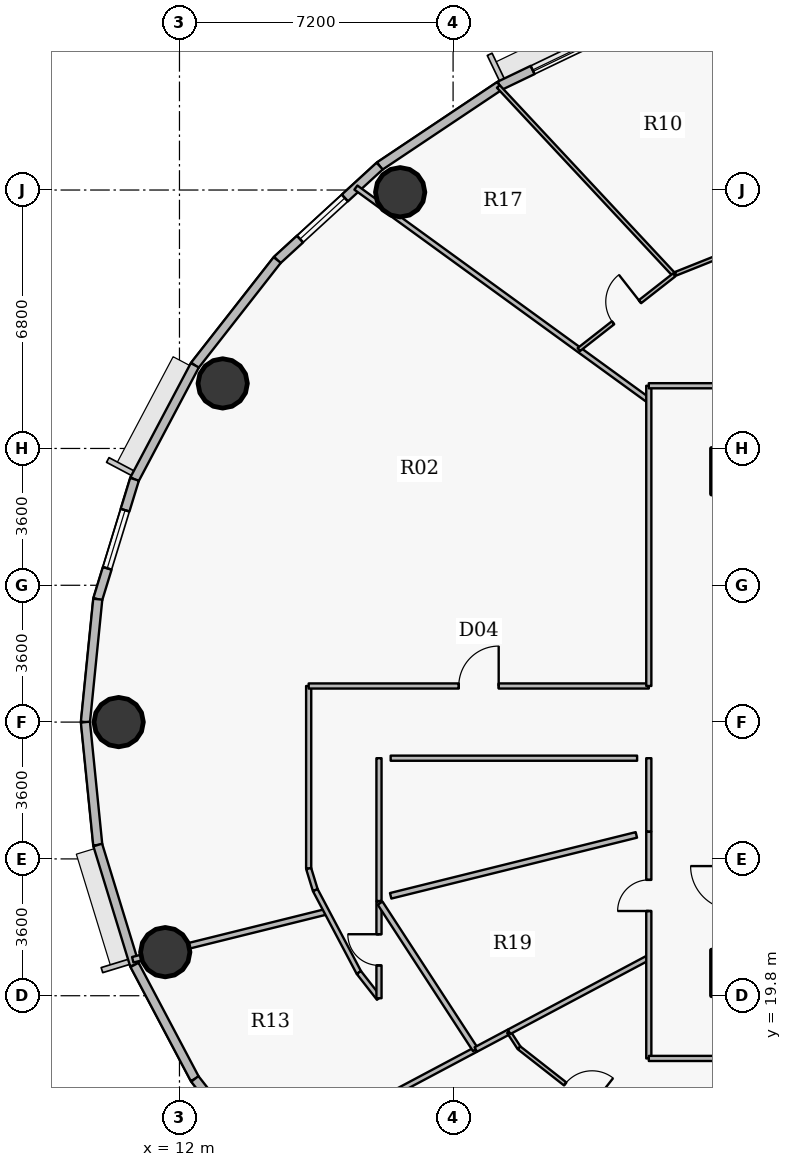
"""IFC4 building model, lengths in metres.
Left out: names, types, materials, properties, quantities, classifications, styles, units other than length and angle.
Written with IfcOpenShell. Run it as: python <this file> out.ifc"""

import sys

from ifc_helpers import new_model, si_unit, direction, frame, frame_2d, origin, origin_2d, place, context, subcontext, project, spatial, rectangle, hollow_circle, extrude, source, transform, mapped, element, fill, save


model = new_model("IFC4")
c1 = context("Model", 3, precision=1e-05, world=origin(), true_north=direction((0.0, 1.0)))
c2 = subcontext(c1, "Body", "Model", "MODEL_VIEW")
j1 = project(units=[si_unit("LENGTHUNIT", "METRE"), si_unit("PLANEANGLEUNIT", "RADIAN")], contexts=[c1])
p1 = place(None, origin())
s1 = spatial("IfcSite", under=j1, at=p1, CompositionType="ELEMENT")
p2 = place(p1, origin())
s2 = spatial("IfcBuilding", under=s1, at=p2, CompositionType="ELEMENT")
p3 = place(p2, frame((0.0, 0.0, 201.15)))
s3 = spatial("IfcBuildingStorey", under=s2, at=p3, CompositionType="ELEMENT", Elevation=201.15)
for number, where, z_axis, x_axis in (
    (1, (26.6, 20.4, 0.0), (0.0, 0.0, 1.0), (1.0, 0.0, 0.0)),
    (2, (26.6, 33.6, 0.0), (0.0, 0.0, 1.0), (1.0, 0.0, 0.0)),
):
    element("IfcColumn", number, at=place(p3, frame(where, z_axis=z_axis, x_axis=x_axis)), inside=s3, PredefinedType="COLUMN", context=c2, shape_type="SweptSolid", body=[
        extrude(rectangle(XDim=1.2, YDim=1.2, at=origin_2d()), origin(), (0.0, 0.0, 1.0), 3.75),
    ])
for number, where, z_axis, x_axis in (
    (3, (17.808, 40.942, 0.0), (0.0, 0.0, 1.0), (1.0, 0.0, 0.0)),
    (4, (13.137, 35.911, 0.0), (0.0, 0.0, 1.0), (1.0, 0.0, 0.0)),
    (5, (10.4, 27.0, 0.0), (0.0, 0.0, 1.0), (1.0, 0.0, 0.0)),
    (6, (11.625, 20.947, 0.0), (0.0, 0.0, 1.0), (1.0, 0.0, 0.0)),
):
    element("IfcColumn", number, at=place(p3, frame(where, z_axis=z_axis, x_axis=x_axis)), inside=s3, PredefinedType="COLUMN", context=c2, shape_type="SweptSolid", body=[
        extrude(hollow_circle(Radius=0.65, WallThickness=0.04, at=origin_2d()), origin(), (0.0, 0.0, 1.0), 3.75),
    ])
p4 = place(p3, frame((20.427, 43.743, 0.0), z_axis=(0.0, 0.0, 1.0), x_axis=(0.901564733809, 0.432644231155, 0.0)))
e7 = element("IfcWall", 7, at=p4, inside=s3, PredefinedType="SOLIDWALL", context=c2, shape_type="SweptSolid", body=[
    extrude(rectangle(XDim=3.93, YDim=0.24, at=frame_2d((1.965, 0.0))), origin(), (0.0, 0.0, 1.0), 3.45),
])
p5 = place(p4, frame((0.96, 0.0, 0.9)))
e8 = element("IfcOpeningElement", 8, at=p5, cuts=e7, PredefinedType="OPENING", context=c2, shape_type="SweptSolid", body=[
    extrude(rectangle(XDim=2.0, YDim=1.75, at=origin_2d()), frame((1.0, 0.13, 0.875), z_axis=(0.0, -1.0, 0.0), x_axis=(1.0, 0.0, 0.0)), (0.0, 0.0, 1.0), 0.26),
])
p6 = place(p3, frame((17.268, 41.631, 0.0), z_axis=(0.0, 0.0, 1.0), x_axis=(0.831228998277, 0.555930168657, 0.0)))
e9 = element("IfcWall", 9, at=p6, inside=s3, PredefinedType="SOLIDWALL", context=c2, shape_type="SweptSolid", body=[
    extrude(rectangle(XDim=3.8, YDim=0.24, at=frame_2d((1.9, 0.0))), origin(), (0.0, 0.0, 1.0), 3.45),
])
p7 = place(p3, frame((14.572, 39.158, 0.0), z_axis=(0.0, 0.0, 1.0), x_axis=(0.737076565834, 0.675809245349, 0.0)))
e10 = element("IfcWall", 10, at=p7, inside=s3, PredefinedType="SOLIDWALL", context=c2, shape_type="SweptSolid", body=[
    extrude(rectangle(XDim=3.658, YDim=0.24, at=frame_2d((1.829, 0.0))), origin(), (0.0, 0.0, 1.0), 3.45),
])
p8 = place(p7, frame((0.815, 0.0, 0.9)))
e11 = element("IfcOpeningElement", 11, at=p8, cuts=e10, PredefinedType="OPENING", context=c2, shape_type="SweptSolid", body=[
    extrude(rectangle(XDim=1.6, YDim=1.75, at=origin_2d()), frame((0.8, 0.13, 0.875), z_axis=(0.0, -1.0, 0.0), x_axis=(1.0, 0.0, 0.0)), (0.0, 0.0, 1.0), 0.26),
])
p9 = place(p3, frame((12.404, 36.388, 0.0), z_axis=(0.0, 0.0, 1.0), x_axis=(0.616287674549, 0.787521112224, 0.0)))
e12 = element("IfcWall", 12, at=p9, inside=s3, PredefinedType="SOLIDWALL", context=c2, shape_type="SweptSolid", body=[
    extrude(rectangle(XDim=3.517, YDim=0.24, at=frame_2d((1.759, 0.0))), origin(), (0.0, 0.0, 1.0), 3.45),
])
p10 = place(p3, frame((10.817, 33.389, 0.0), z_axis=(0.0, 0.0, 1.0), x_axis=(0.467586874938, 0.88394712194, 0.0)))
e13 = element("IfcWall", 13, at=p10, inside=s3, PredefinedType="SOLIDWALL", context=c2, shape_type="SweptSolid", body=[
    extrude(rectangle(XDim=3.393, YDim=0.24, at=frame_2d((1.697, 0.0))), origin(), (0.0, 0.0, 1.0), 3.45),
])
p11 = place(p3, frame((9.85, 30.234, 0.0), z_axis=(0.0, 0.0, 1.0), x_axis=(0.293097995113, 0.956082405058, 0.0)))
e14 = element("IfcWall", 14, at=p11, inside=s3, PredefinedType="SOLIDWALL", context=c2, shape_type="SweptSolid", body=[
    extrude(rectangle(XDim=3.3, YDim=0.24, at=frame_2d((1.65, 0.0))), origin(), (0.0, 0.0, 1.0), 3.45),
])
p12 = place(p11, frame((0.85, 0.0, 0.9)))
e15 = element("IfcOpeningElement", 15, at=p12, cuts=e14, PredefinedType="OPENING", context=c2, shape_type="SweptSolid", body=[
    extrude(rectangle(XDim=1.6, YDim=1.75, at=origin_2d()), frame((0.8, 0.13, 0.875), z_axis=(0.0, -1.0, 0.0), x_axis=(1.0, 0.0, 0.0)), (0.0, 0.0, 1.0), 0.26),
])
for number, where, z_axis, x_axis in (
    (16, (9.525, 27.0, 0.0), (0.0, 0.0, 1.0), (0.1, 0.995, 0.0)),
    (17, (9.85, 23.766, 0.0), (0.0, 0.0, 1.0), (-0.1, 0.995, 0.0)),
):
    element("IfcWall", number, at=place(p3, frame(where, z_axis=z_axis, x_axis=x_axis)), inside=s3, PredefinedType="SOLIDWALL", context=c2, shape_type="SweptSolid", body=[
        extrude(rectangle(XDim=3.25, YDim=0.24, at=frame_2d((1.625, 0.0))), origin(), (0.0, 0.0, 1.0), 3.45),
    ])
p13 = place(p3, frame((10.817, 20.611, 0.0), z_axis=(0.0, 0.0, 1.0), x_axis=(-0.293097995113, 0.956082405058, 0.0)))
e18 = element("IfcWall", 18, at=p13, inside=s3, PredefinedType="SOLIDWALL", context=c2, shape_type="SweptSolid", body=[
    extrude(rectangle(XDim=3.3, YDim=0.24, at=frame_2d((1.65, 0.0))), origin(), (0.0, 0.0, 1.0), 3.45),
])
p14 = place(p3, frame((12.404, 17.612, 0.0), z_axis=(0.0, 0.0, 1.0), x_axis=(-0.467586874938, 0.88394712194, 0.0)))
e19 = element("IfcWall", 19, at=p14, inside=s3, PredefinedType="SOLIDWALL", context=c2, shape_type="SweptSolid", body=[
    extrude(rectangle(XDim=3.393, YDim=0.24, at=frame_2d((1.697, 0.0))), origin(), (0.0, 0.0, 1.0), 3.45),
])
p15 = place(p3, frame((14.572, 14.842, 0.0), z_axis=(0.0, 0.0, 1.0), x_axis=(-0.616287674549, 0.787521112224, 0.0)))
e20 = element("IfcWall", 20, at=p15, inside=s3, PredefinedType="SOLIDWALL", context=c2, shape_type="SweptSolid", body=[
    extrude(rectangle(XDim=3.517, YDim=0.24, at=frame_2d((1.759, 0.0))), origin(), (0.0, 0.0, 1.0), 3.45),
])
p16 = place(p15, frame((0.819, 0.0, 0.9)))
e21 = element("IfcOpeningElement", 21, at=p16, cuts=e20, PredefinedType="OPENING", context=c2, shape_type="SweptSolid", body=[
    extrude(rectangle(XDim=2.0, YDim=1.75, at=origin_2d()), frame((1.0, 0.13, 0.875), z_axis=(0.0, -1.0, 0.0), x_axis=(1.0, 0.0, 0.0)), (0.0, 0.0, 1.0), 0.26),
])
p17 = place(p3, frame((10.771, 20.747, 0.0), z_axis=(0.0, 0.0, 1.0), x_axis=(0.970640303721, 0.240535653891, 0.0)))
e22 = element("IfcWall", 22, at=p17, inside=s3, PredefinedType="PARTITIONING", context=c2, shape_type="SweptSolid", body=[
    extrude(rectangle(XDim=5.258, YDim=0.15, at=frame_2d((2.629, 0.0))), origin(), (0.0, 0.0, 1.0), 2.885),
])
p18 = place(p3, frame((14.145, 15.379, 0.0), z_axis=(0.0, 0.0, 1.0), x_axis=(0.882932689309, 0.469499591214, 0.0)))
e23 = element("IfcWall", 23, at=p18, inside=s3, PredefinedType="PARTITIONING", context=c2, shape_type="SweptSolid", body=[
    extrude(rectangle(XDim=6.392, YDim=0.135, at=frame_2d((3.196, 0.0))), origin(), (0.0, 0.0, 1.0), 2.885),
])
p19 = place(p3, frame((15.4, 23.146, 0.0), z_axis=(0.0, 0.0, 1.0), x_axis=(0.0, 1.0, 0.0)))
e24 = element("IfcWall", 24, at=p19, inside=s3, PredefinedType="PARTITIONING", context=c2, shape_type="SweptSolid", body=[
    extrude(rectangle(XDim=4.804, YDim=0.135, at=frame_2d((2.402, 0.0))), origin(), (0.0, 0.0, 1.0), 2.885),
])
p20 = place(p3, frame((15.4, 23.146, 0.0), z_axis=(0.0, 0.0, 1.0), x_axis=(0.293335154151, -0.956009669061, 0.0)))
e25 = element("IfcWall", 25, at=p20, inside=s3, PredefinedType="PARTITIONING", context=c2, shape_type="SweptSolid", body=[
    extrude(rectangle(XDim=0.594, YDim=0.135, at=frame_2d((0.297, 0.0))), origin(), (0.0, 0.0, 1.0), 3.45),
])
p21 = place(p3, frame((15.4, 27.95, 0.0), z_axis=(0.0, 0.0, 1.0), x_axis=(1.0, 0.0, 0.0)))
e26 = element("IfcWall", 26, at=p21, inside=s3, PredefinedType="PARTITIONING", context=c2, shape_type="SweptSolid", body=[
    extrude(rectangle(XDim=8.95, YDim=0.135, at=frame_2d((4.475, 0.0))), origin(), (0.0, 0.0, 1.0), 3.45),
])
p22 = place(p21, frame((3.95, 0.0, 0.0)))
e27 = element("IfcOpeningElement", 27, at=p22, cuts=e26, PredefinedType="OPENING", context=c2, shape_type="SweptSolid", body=[
    extrude(rectangle(XDim=1.05, YDim=2.15, at=origin_2d()), frame((0.525, 0.078, 1.075), z_axis=(0.0, -1.0, 0.0), x_axis=(1.0, 0.0, 0.0)), (0.0, 0.0, 1.0), 0.155),
])
p23 = place(p3, frame((15.574, 22.578, 0.0), z_axis=(0.0, 0.0, 1.0), x_axis=(0.467530807018, -0.883976778252, 0.0)))
e28 = element("IfcWall", 28, at=p23, inside=s3, PredefinedType="PARTITIONING", context=c2, shape_type="SweptSolid", body=[
    extrude(rectangle(XDim=2.452, YDim=0.135, at=frame_2d((1.226, 0.0))), origin(), (0.0, 0.0, 1.0), 2.885),
])
p24 = place(p3, frame((16.643, 41.064, 0.0), z_axis=(0.0, 0.0, 1.0), x_axis=(0.809016355942, -0.587786131018, 0.0)))
e29 = element("IfcWall", 29, at=p24, inside=s3, PredefinedType="PARTITIONING", context=c2, shape_type="SweptSolid", body=[
    extrude(rectangle(XDim=9.527, YDim=0.135, at=frame_2d((4.764, 0.0))), origin(), (0.0, 0.0, 1.0), 2.885),
])
p25 = place(p3, frame((16.72, 20.411, 0.0), z_axis=(0.0, 0.0, 1.0), x_axis=(0.616377221056, -0.787451027914, 0.0)))
e30 = element("IfcWall", 30, at=p25, inside=s3, PredefinedType="PARTITIONING", context=c2, shape_type="SweptSolid", body=[
    extrude(rectangle(XDim=0.859, YDim=0.135, at=frame_2d((0.43, 0.0))), origin(), (0.0, 0.0, 1.0), 3.45),
])
p26 = place(p3, frame((17.25, 19.734, 0.0), z_axis=(0.0, 0.0, 1.0), x_axis=(0.0, 1.0, 0.0)))
e31 = element("IfcWall", 31, at=p26, inside=s3, PredefinedType="PARTITIONING", context=c2, shape_type="SweptSolid", body=[
    extrude(rectangle(XDim=2.548, YDim=0.135, at=frame_2d((1.274, 0.0))), origin(), (0.0, 0.0, 1.0), 2.885),
])
p27 = place(p26, frame((0.864, 0.0, 0.0)))
e32 = element("IfcOpeningElement", 32, at=p27, cuts=e31, PredefinedType="OPENING", context=c2, shape_type="SweptSolid", body=[
    extrude(rectangle(XDim=0.82, YDim=2.1, at=origin_2d()), frame((0.41, 0.078, 1.05), z_axis=(0.0, -1.0, 0.0), x_axis=(1.0, 0.0, 0.0)), (0.0, 0.0, 1.0), 0.155),
])
p28 = place(p3, frame((17.279, 22.237, 0.0), z_axis=(0.0, 0.0, 1.0), x_axis=(0.545383699519, -0.83818650687, 0.0)))
e33 = element("IfcWall", 33, at=p28, inside=s3, PredefinedType="PARTITIONING", context=c2, shape_type="SweptSolid", body=[
    extrude(rectangle(XDim=4.601, YDim=0.15, at=frame_2d((2.3, 0.0))), origin(), (0.0, 0.0, 1.0), 2.885),
])
p29 = place(p3, frame((19.798, 18.385, 0.0), z_axis=(0.0, 0.0, 1.0), x_axis=(0.882964446326, 0.469439864652, 0.0)))
e34 = element("IfcWall", 34, at=p29, inside=s3, PredefinedType="PARTITIONING", context=c2, shape_type="SweptSolid", body=[
    extrude(rectangle(XDim=0.982, YDim=0.135, at=frame_2d((0.491, 0.0))), origin(), (0.0, 0.0, 1.0), 3.45),
])
p30 = place(p3, frame((20.39, 43.725, 0.0), z_axis=(0.0, 0.0, 1.0), x_axis=(0.682297728918, -0.73107442105, 0.0)))
e35 = element("IfcWall", 35, at=p30, inside=s3, PredefinedType="PARTITIONING", context=c2, shape_type="SweptSolid", body=[
    extrude(rectangle(XDim=6.782, YDim=0.1, at=frame_2d((3.391, 0.0))), origin(), (0.0, 0.0, 1.0), 2.885),
])
p31 = place(p3, frame((20.665, 18.846, 0.0), z_axis=(0.0, 0.0, 1.0), x_axis=(0.545143704476, -0.838342615802, 0.0)))
e36 = element("IfcWall", 36, at=p31, inside=s3, PredefinedType="PARTITIONING", context=c2, shape_type="SweptSolid", body=[
    extrude(rectangle(XDim=0.497, YDim=0.1, at=frame_2d((0.249, 0.0))), origin(), (0.0, 0.0, 1.0), 3.45),
])
p32 = place(p3, frame((20.674, 18.851, 0.0), z_axis=(0.0, 0.0, 1.0), x_axis=(0.882934968765, 0.469495304483, 0.0)))
e37 = element("IfcWall", 37, at=p32, inside=s3, PredefinedType="PARTITIONING", context=c2, shape_type="SweptSolid", body=[
    extrude(rectangle(XDim=4.164, YDim=0.135, at=frame_2d((2.082, 0.0))), origin(), (0.0, 0.0, 1.0), 3.45),
])
p33 = place(p3, frame((20.936, 18.429, 0.0), z_axis=(0.0, 0.0, 1.0), x_axis=(0.787322805473, -0.61654099619, 0.0)))
e38 = element("IfcWall", 38, at=p33, inside=s3, PredefinedType="PARTITIONING", context=c2, shape_type="SweptSolid", body=[
    extrude(rectangle(XDim=5.232, YDim=0.1, at=frame_2d((2.616, 0.0))), origin(), (0.0, 0.0, 1.0), 2.885),
])
p34 = place(p33, frame((1.541, 0.0, 0.0)))
e39 = element("IfcOpeningElement", 39, at=p34, cuts=e38, PredefinedType="OPENING", context=c2, shape_type="SweptSolid", body=[
    extrude(rectangle(XDim=0.9, YDim=2.1, at=origin_2d()), frame((0.45, 0.06, 1.05), z_axis=(0.0, -1.0, 0.0), x_axis=(1.0, 0.0, 0.0)), (0.0, 0.0, 1.0), 0.12),
])
p35 = place(p3, frame((22.509, 36.802, 0.0), z_axis=(0.0, 0.0, 1.0), x_axis=(0.787322269852, 0.616541680177, 0.0)))
e40 = element("IfcWall", 40, at=p35, inside=s3, PredefinedType="PARTITIONING", context=c2, shape_type="SweptSolid", body=[
    extrude(rectangle(XDim=3.187, YDim=0.1, at=frame_2d((1.593, 0.0))), origin(), (0.0, 0.0, 1.0), 2.885),
])
p36 = place(p35, frame((1.143, 0.0, 0.0)))
e41 = element("IfcOpeningElement", 41, at=p36, cuts=e40, PredefinedType="OPENING", context=c2, shape_type="SweptSolid", body=[
    extrude(rectangle(XDim=0.9, YDim=2.1, at=origin_2d()), frame((0.45, 0.06, 1.05), z_axis=(0.0, -1.0, 0.0), x_axis=(1.0, 0.0, 0.0)), (0.0, 0.0, 1.0), 0.12),
])
p37 = place(p3, frame((24.35, 18.15, 0.0), z_axis=(0.0, 0.0, 1.0), x_axis=(0.0, 1.0, 0.0)))
e42 = element("IfcWall", 42, at=p37, inside=s3, PredefinedType="PARTITIONING", context=c2, shape_type="SweptSolid", body=[
    extrude(rectangle(XDim=5.963, YDim=0.135, at=frame_2d((2.981, 0.0))), origin(), (0.0, 0.0, 1.0), 2.885),
])
p38 = place(p37, frame((3.879, 0.0, 0.0)))
e43 = element("IfcOpeningElement", 43, at=p38, cuts=e42, PredefinedType="OPENING", context=c2, shape_type="SweptSolid", body=[
    extrude(rectangle(XDim=0.82, YDim=2.1, at=origin_2d()), frame((0.41, 0.078, 1.05), z_axis=(0.0, -1.0, 0.0), x_axis=(1.0, 0.0, 0.0)), (0.0, 0.0, 1.0), 0.155),
])
p39 = place(p3, frame((24.35, 18.15, 0.0), z_axis=(0.0, 0.0, 1.0), x_axis=(1.0, 0.0, 0.0)))
e44 = element("IfcWall", 44, at=p39, inside=s3, PredefinedType="PARTITIONING", context=c2, shape_type="SweptSolid", body=[
    extrude(rectangle(XDim=9.109, YDim=0.135, at=frame_2d((4.554, 0.0))), origin(), (0.0, 0.0, 1.0), 2.885),
])
p40 = place(p39, frame((4.054, 0.0, 0.0)))
e45 = element("IfcOpeningElement", 45, at=p40, cuts=e44, PredefinedType="OPENING", context=c2, shape_type="SweptSolid", body=[
    extrude(rectangle(XDim=1.0, YDim=2.15, at=origin_2d()), frame((0.5, 0.078, 1.075), z_axis=(0.0, -1.0, 0.0), x_axis=(1.0, 0.0, 0.0)), (0.0, 0.0, 1.0), 0.155),
])
p41 = place(p3, frame((24.35, 27.95, 0.0), z_axis=(0.0, 0.0, 1.0), x_axis=(0.0, 1.0, 0.0)))
e46 = element("IfcWall", 46, at=p41, inside=s3, PredefinedType="PARTITIONING", context=c2, shape_type="SweptSolid", body=[
    extrude(rectangle(XDim=7.9, YDim=0.135, at=frame_2d((3.95, 0.0))), origin(), (0.0, 0.0, 1.0), 2.885),
])
p42 = place(p3, frame((24.35, 35.85, 0.0), z_axis=(0.0, 0.0, 1.0), x_axis=(1.0, 0.0, 0.0)))
e47 = element("IfcWall", 47, at=p42, inside=s3, PredefinedType="PARTITIONING", context=c2, shape_type="SweptSolid", body=[
    extrude(rectangle(XDim=11.942, YDim=0.135, at=frame_2d((5.971, 0.0))), origin(), (0.0, 0.0, 1.0), 2.885),
])
p43 = place(p42, frame((5.471, 0.0, 0.0)))
e48 = element("IfcOpeningElement", 48, at=p43, cuts=e47, PredefinedType="OPENING", context=c2, shape_type="SweptSolid", body=[
    extrude(rectangle(XDim=1.0, YDim=2.15, at=origin_2d()), frame((0.5, 0.078, 1.075), z_axis=(0.0, -1.0, 0.0), x_axis=(1.0, 0.0, 0.0)), (0.0, 0.0, 1.0), 0.155),
])
p44 = place(p3, frame((25.055, 38.796, 0.0), z_axis=(0.0, 0.0, 1.0), x_axis=(0.928801214375, 0.370578337434, 0.0)))
e49 = element("IfcWall", 49, at=p44, inside=s3, PredefinedType="PARTITIONING", context=c2, shape_type="SweptSolid", body=[
    extrude(rectangle(XDim=4.664, YDim=0.1, at=frame_2d((2.332, 0.0))), origin(), (0.0, 0.0, 1.0), 3.45),
])
p45 = place(p3, frame((17.25, 26.05, 0.0), z_axis=(0.0, 0.0, 1.0), x_axis=(0.0, -1.0, 0.0)))
e50 = element("IfcWall", 50, at=p45, inside=s3, PredefinedType="PARTITIONING", context=c2, shape_type="SweptSolid", body=[
    extrude(rectangle(XDim=3.758, YDim=0.135, at=frame_2d((1.879, 0.0))), origin(), (0.0, 0.0, 1.0), 2.885),
])
p46 = place(p3, frame((24.35, 24.123, 0.0), z_axis=(0.0, 0.0, 1.0), x_axis=(0.0, 1.0, 0.0)))
e51 = element("IfcWall", 51, at=p46, inside=s3, PredefinedType="PARTITIONING", context=c2, shape_type="SweptSolid", body=[
    extrude(rectangle(XDim=1.927, YDim=0.135, at=frame_2d((0.964, 0.0))), origin(), (0.0, 0.0, 1.0), 2.885),
])
p47 = place(p3, frame((24.042, 26.05, 0.0), z_axis=(0.0, 0.0, 1.0), x_axis=(-1.0, 0.0, 0.0)))
e52 = element("IfcWall", 52, at=p47, inside=s3, PredefinedType="PARTITIONING", context=c2, shape_type="SweptSolid", body=[
    extrude(rectangle(XDim=6.485, YDim=0.135, at=frame_2d((3.242, 0.0))), origin(), (0.0, 0.0, 1.0), 3.45),
])
p48 = place(p3, frame((17.558, 22.429, 0.0), z_axis=(0.0, 0.0, 1.0), x_axis=(0.970632119323, 0.240568678214, 0.0)))
e53 = element("IfcWall", 53, at=p48, inside=s3, PredefinedType="PARTITIONING", context=c2, shape_type="SweptSolid", body=[
    extrude(rectangle(XDim=6.66, YDim=0.15, at=frame_2d((3.33, 0.0))), origin(), (0.0, 0.0, 1.0), 2.885),
])
m1 = source(origin(), c2, "Body", "SweptSolid", [
    extrude(rectangle(XDim=2.0, YDim=1.75, at=origin_2d()), frame((1.0, 0.03, 0.875), z_axis=(0.0, -1.0, 0.0), x_axis=(1.0, 0.0, 0.0)), (0.0, 0.0, 1.0), 0.06),
])
p49 = place(p5, origin())
e54 = element("IfcWindow", 54, at=p49, inside=s3, PartitioningType="DOUBLE_PANEL_VERTICAL", PredefinedType="WINDOW", context=c2, shape_type="MappedRepresentation", body=[
    mapped(m1, transform((0.0, 0.0, 0.0), x_axis=(1.0, 0.0, 0.0), y_axis=(0.0, 1.0, 0.0), z_axis=(0.0, 0.0, 1.0), scale=1.0)),
])
fill(e8, e54)
m2 = source(origin(), c2, "Body", "SweptSolid", [
    extrude(rectangle(XDim=1.6, YDim=1.75, at=origin_2d()), frame((0.8, 0.03, 0.875), z_axis=(0.0, -1.0, 0.0), x_axis=(1.0, 0.0, 0.0)), (0.0, 0.0, 1.0), 0.06),
])
p50 = place(p8, origin())
e55 = element("IfcWindow", 55, at=p50, inside=s3, PartitioningType="DOUBLE_PANEL_VERTICAL", PredefinedType="WINDOW", context=c2, shape_type="MappedRepresentation", body=[
    mapped(m2, transform((0.0, 0.0, 0.0), x_axis=(1.0, 0.0, 0.0), y_axis=(0.0, 1.0, 0.0), z_axis=(0.0, 0.0, 1.0), scale=1.0)),
])
fill(e11, e55)
p51 = place(p12, origin())
e56 = element("IfcWindow", 56, at=p51, inside=s3, PartitioningType="DOUBLE_PANEL_VERTICAL", PredefinedType="WINDOW", context=c2, shape_type="MappedRepresentation", body=[
    mapped(m2, transform((0.0, 0.0, 0.0), x_axis=(1.0, 0.0, 0.0), y_axis=(0.0, 1.0, 0.0), z_axis=(0.0, 0.0, 1.0), scale=1.0)),
])
fill(e15, e56)
m3 = source(origin(), c2, "Body", "SweptSolid", [
    extrude(rectangle(XDim=0.9, YDim=2.1, at=origin_2d()), frame((0.45, 0.025, 1.05), z_axis=(0.0, -1.0, 0.0), x_axis=(1.0, 0.0, 0.0)), (0.0, 0.0, 1.0), 0.05),
])
p52 = place(p34, origin())
e57 = element("IfcDoor", 57, at=p52, inside=s3, OperationType="SINGLE_SWING_RIGHT", PredefinedType="DOOR", context=c2, shape_type="MappedRepresentation", body=[
    mapped(m3, transform((0.0, 0.0, 0.0), x_axis=(1.0, 0.0, 0.0), y_axis=(0.0, 1.0, 0.0), z_axis=(0.0, 0.0, 1.0), scale=1.0)),
])
fill(e39, e57)
p53 = place(p36, origin())
e58 = element("IfcDoor", 58, at=p53, inside=s3, OperationType="SINGLE_SWING_RIGHT", PredefinedType="DOOR", context=c2, shape_type="MappedRepresentation", body=[
    mapped(m3, transform((0.0, 0.0, 0.0), x_axis=(1.0, 0.0, 0.0), y_axis=(0.0, 1.0, 0.0), z_axis=(0.0, 0.0, 1.0), scale=1.0)),
])
fill(e41, e58)
m4 = source(origin(), c2, "Body", "SweptSolid", [
    extrude(rectangle(XDim=1.05, YDim=2.15, at=origin_2d()), frame((0.525, 0.025, 1.075), z_axis=(0.0, -1.0, 0.0), x_axis=(1.0, 0.0, 0.0)), (0.0, 0.0, 1.0), 0.05),
])
p54 = place(p22, origin())
e59 = element("IfcDoor", 59, at=p54, inside=s3, OperationType="SINGLE_SWING_RIGHT", PredefinedType="DOOR", context=c2, shape_type="MappedRepresentation", body=[
    mapped(m4, transform((0.0, 0.0, 0.0), x_axis=(1.0, 0.0, 0.0), y_axis=(0.0, 1.0, 0.0), z_axis=(0.0, 0.0, 1.0), scale=1.0)),
])
fill(e27, e59)
m5 = source(origin(), c2, "Body", "SweptSolid", [
    extrude(rectangle(XDim=0.82, YDim=2.1, at=origin_2d()), frame((0.41, 0.025, 1.05), z_axis=(0.0, -1.0, 0.0), x_axis=(1.0, 0.0, 0.0)), (0.0, 0.0, 1.0), 0.05),
])
p55 = place(p38, origin())
e60 = element("IfcDoor", 60, at=p55, inside=s3, OperationType="SINGLE_SWING_LEFT", PredefinedType="DOOR", context=c2, shape_type="MappedRepresentation", body=[
    mapped(m5, transform((0.0, 0.0, 0.0), x_axis=(1.0, 0.0, 0.0), y_axis=(0.0, 1.0, 0.0), z_axis=(0.0, 0.0, 1.0), scale=1.0)),
])
fill(e43, e60)
p56 = place(p27, origin())
e61 = element("IfcDoor", 61, at=p56, inside=s3, OperationType="SINGLE_SWING_RIGHT", PredefinedType="DOOR", context=c2, shape_type="MappedRepresentation", body=[
    mapped(m5, transform((0.0, 0.0, 0.0), x_axis=(1.0, 0.0, 0.0), y_axis=(0.0, 1.0, 0.0), z_axis=(0.0, 0.0, 1.0), scale=1.0)),
])
fill(e32, e61)
save(model, sys.argv[1])
